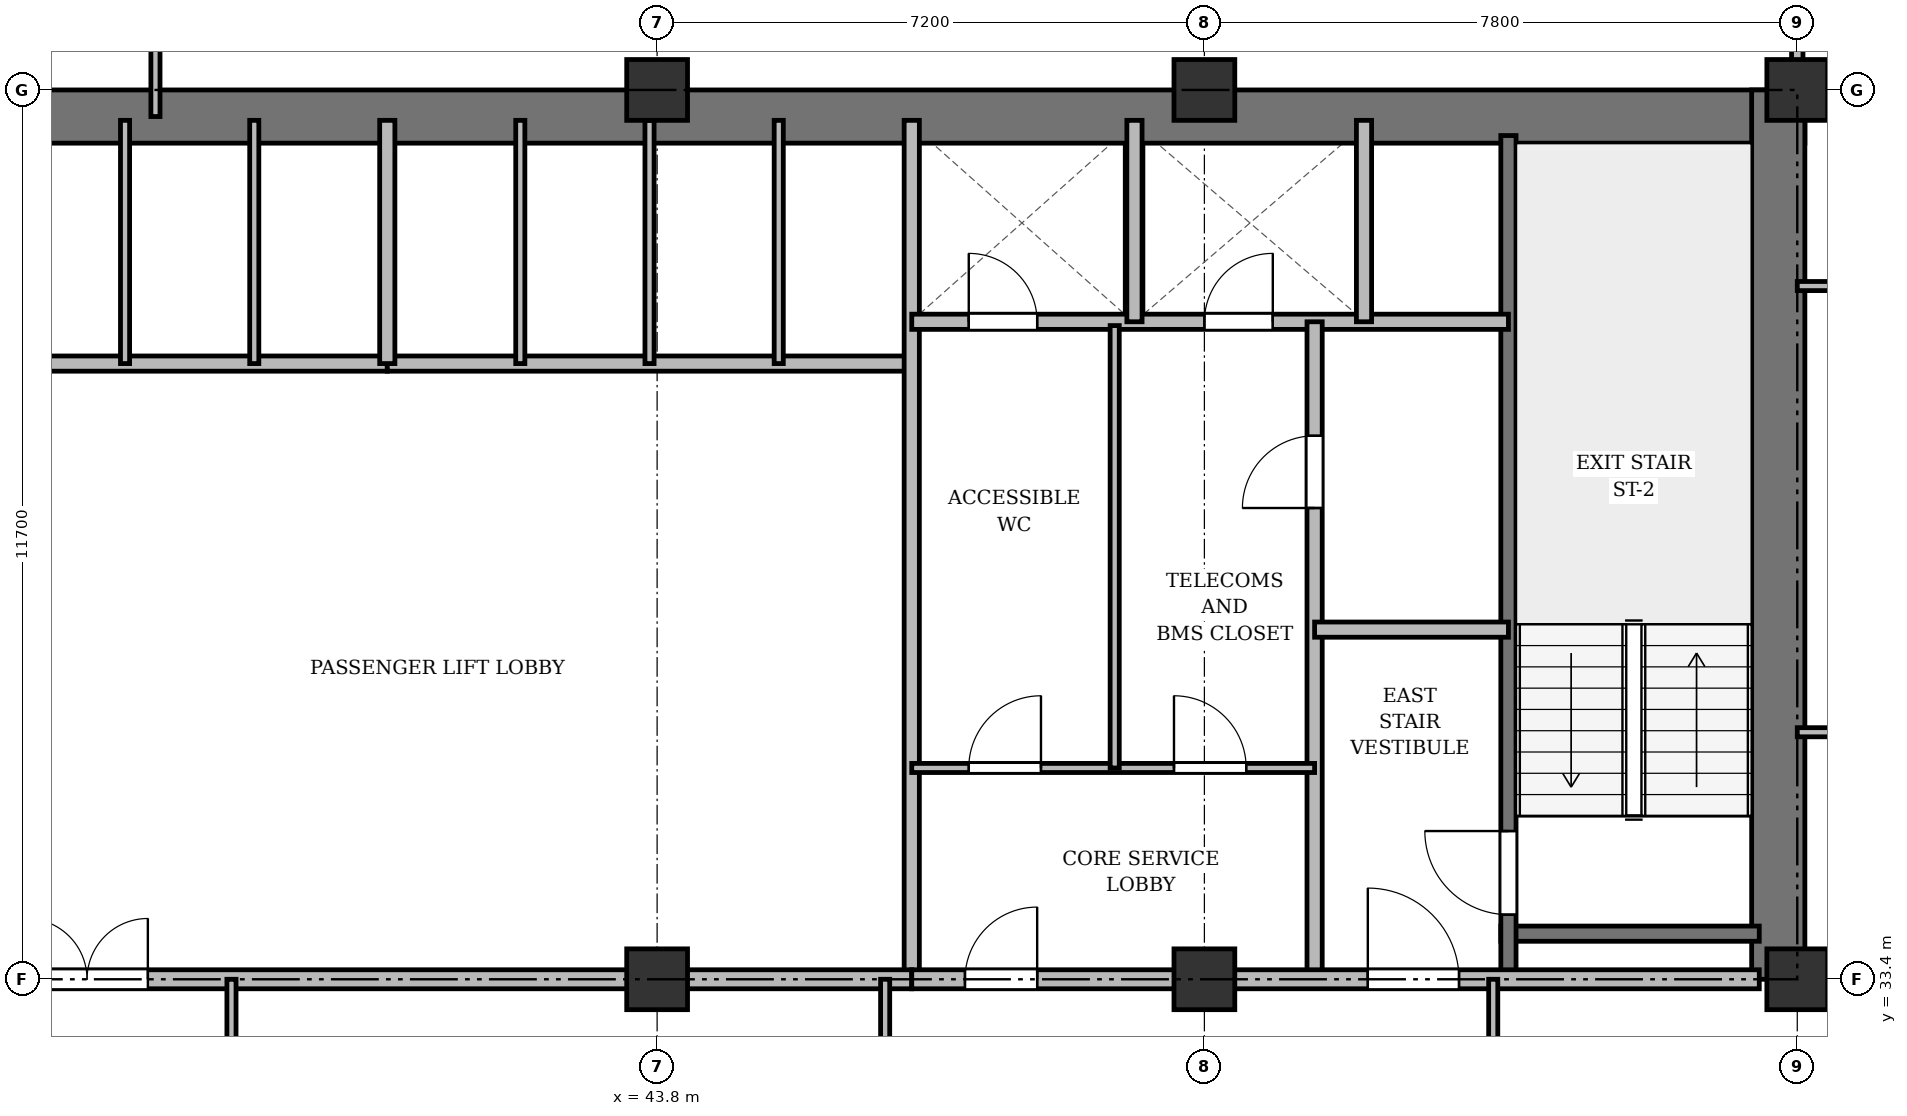
"""IFC4 building model, lengths in metres.
Left out: names, types, materials, properties, quantities, classifications, styles, units other than length and angle.
Written with IfcOpenShell. Run it as: python <this file> out.ifc"""

import sys

from ifc_helpers import new_model, si_unit, direction, frame, frame_2d, origin, origin_2d, place, context, subcontext, project, spatial, rectangle, extrude, source, transform, mapped, element, fill, save


model = new_model("IFC4")
c1 = context("Model", 3, precision=1e-05, world=origin(), true_north=direction((0.0, 1.0)))
c2 = subcontext(c1, "Body", "Model", "MODEL_VIEW")
j1 = project(units=[si_unit("LENGTHUNIT", "METRE"), si_unit("PLANEANGLEUNIT", "RADIAN")], contexts=[c1])
p1 = place(None, origin())
s1 = spatial("IfcSite", under=j1, at=p1, CompositionType="ELEMENT")
p2 = place(p1, origin())
s2 = spatial("IfcBuilding", under=s1, at=p2, CompositionType="ELEMENT")
p3 = place(p2, frame((0.0, 0.0, 85.3)))
s3 = spatial("IfcBuildingStorey", under=s2, at=p3, CompositionType="ELEMENT", Elevation=85.3)
m1 = source(origin(), c2, "Body", "SweptSolid", [
    extrude(rectangle(XDim=0.8, YDim=0.8, at=origin_2d()), origin(), (0.0, 0.0, 1.0), 3.6),
])
for number, where, z_axis, x_axis in (
    (1, (43.8, 33.4, 0.0), (0.0, 0.0, 1.0), (1.0, 0.0, 0.0)),
    (2, (43.8, 45.1, 0.0), (0.0, 0.0, 1.0), (1.0, 0.0, 0.0)),
    (3, (51.0, 33.4, 0.0), (0.0, 0.0, 1.0), (1.0, 0.0, 0.0)),
    (4, (51.0, 45.1, 0.0), (0.0, 0.0, 1.0), (1.0, 0.0, 0.0)),
    (5, (58.8, 33.4, 0.0), (0.0, 0.0, 1.0), (1.0, 0.0, 0.0)),
    (6, (58.8, 45.1, 0.0), (0.0, 0.0, 1.0), (1.0, 0.0, 0.0)),
):
    element("IfcColumn", number, at=place(p3, frame(where, z_axis=z_axis, x_axis=x_axis)), inside=s3, PredefinedType="COLUMN", context=c2, shape_type="MappedRepresentation", body=[
        mapped(m1, transform((0.0, 0.0, 0.0), x_axis=(1.0, 0.0, 0.0), y_axis=(0.0, 1.0, 0.0), z_axis=(0.0, 0.0, 1.0), scale=1.0)),
    ])
p4 = place(p3, frame((15.5, 44.75, 0.0), z_axis=(0.0, 0.0, 1.0), x_axis=(1.0, 0.0, 0.0)))
e7 = element("IfcWall", 7, at=p4, inside=s3, PredefinedType="SHEAR", context=c2, shape_type="SweptSolid", body=[
    extrude(rectangle(XDim=43.4, YDim=0.7, at=frame_2d((21.7, 0.0))), origin(), (0.0, 0.0, 1.0), 3.34),
])
p5 = place(p3, frame((58.55, 33.4, 0.0), z_axis=(0.0, 0.0, 1.0), x_axis=(0.0, 1.0, 0.0)))
e8 = element("IfcWall", 8, at=p5, inside=s3, PredefinedType="SHEAR", context=c2, shape_type="SweptSolid", body=[
    extrude(rectangle(XDim=11.7, YDim=0.7, at=frame_2d((5.85, 0.0))), origin(), (0.0, 0.0, 1.0), 3.34),
])
p6 = place(p3, frame((54.9, 34.0, 0.0), z_axis=(0.0, 0.0, 1.0), x_axis=(1.0, 0.0, 0.0)))
e9 = element("IfcWall", 9, at=p6, inside=s3, PredefinedType="SHEAR", context=c2, shape_type="SweptSolid", body=[
    extrude(rectangle(XDim=3.4, YDim=0.2, at=frame_2d((1.7, 0.0))), origin(), (0.0, 0.0, 1.0), 3.34),
])
p7 = place(p3, frame((55.0, 33.4, 0.0), z_axis=(0.0, 0.0, 1.0), x_axis=(0.0, 1.0, 0.0)))
e10 = element("IfcWall", 10, at=p7, inside=s3, PredefinedType="SHEAR", context=c2, shape_type="SweptSolid", body=[
    extrude(rectangle(XDim=11.1, YDim=0.2, at=frame_2d((5.55, 0.0))), origin(), (0.0, 0.0, 1.0), 3.34),
])
p8 = place(p7, frame((0.85, 0.0, 0.0)))
e11 = element("IfcOpeningElement", 11, at=p8, cuts=e10, PredefinedType="OPENING", context=c2, shape_type="SweptSolid", body=[
    extrude(rectangle(XDim=1.1, YDim=2.15, at=frame_2d((0.55, 1.075))), frame((0.0, 0.11, 0.0), z_axis=(0.0, -1.0, 0.0), x_axis=(1.0, 0.0, 0.0)), (0.0, 0.0, 1.0), 0.22),
])
p9 = place(p3, frame((33.35, 41.5, 0.0), z_axis=(0.0, 0.0, 1.0), x_axis=(1.0, 0.0, 0.0)))
e12 = element("IfcWall", 12, at=p9, inside=s3, PredefinedType="SOLIDWALL", context=c2, shape_type="SweptSolid", body=[
    extrude(rectangle(XDim=6.9, YDim=0.2, at=frame_2d((3.45, 0.0))), origin(), (0.0, 0.0, 1.0), 3.34),
])
for number, where, z_axis, x_axis in (
    (13, (36.8, 41.5, 0.0), (0.0, 0.0, 1.0), (0.0, 1.0, 0.0)),
    (14, (38.5, 41.5, 0.0), (0.0, 0.0, 1.0), (0.0, 1.0, 0.0)),
):
    element("IfcWall", number, at=place(p3, frame(where, z_axis=z_axis, x_axis=x_axis)), inside=s3, PredefinedType="PARTITIONING", context=c2, shape_type="SweptSolid", body=[
        extrude(rectangle(XDim=3.2, YDim=0.12, at=frame_2d((1.6, 0.0))), origin(), (0.0, 0.0, 1.0), 3.34),
    ])
p10 = place(p3, frame((40.25, 41.5, 0.0), z_axis=(0.0, 0.0, 1.0), x_axis=(1.0, 0.0, 0.0)))
e15 = element("IfcWall", 15, at=p10, inside=s3, PredefinedType="SOLIDWALL", context=c2, shape_type="SweptSolid", body=[
    extrude(rectangle(XDim=6.9, YDim=0.2, at=frame_2d((3.45, 0.0))), origin(), (0.0, 0.0, 1.0), 2.84),
])
p11 = place(p3, frame((40.25, 41.5, 0.0), z_axis=(0.0, 0.0, 1.0), x_axis=(0.0, 1.0, 0.0)))
e16 = element("IfcWall", 16, at=p11, inside=s3, PredefinedType="SOLIDWALL", context=c2, shape_type="SweptSolid", body=[
    extrude(rectangle(XDim=3.2, YDim=0.2, at=frame_2d((1.6, 0.0))), origin(), (0.0, 0.0, 1.0), 3.34),
])
p12 = place(p3, frame((42.0, 41.5, 0.0), z_axis=(0.0, 0.0, 1.0), x_axis=(0.0, 1.0, 0.0)))
e17 = element("IfcWall", 17, at=p12, inside=s3, PredefinedType="PARTITIONING", context=c2, shape_type="SweptSolid", body=[
    extrude(rectangle(XDim=3.2, YDim=0.12, at=frame_2d((1.6, 0.0))), origin(), (0.0, 0.0, 1.0), 3.34),
])
p13 = place(p3, frame((43.7, 41.5, 0.0), z_axis=(0.0, 0.0, 1.0), x_axis=(0.0, 1.0, 0.0)))
e18 = element("IfcWall", 18, at=p13, inside=s3, PredefinedType="PARTITIONING", context=c2, shape_type="SweptSolid", body=[
    extrude(rectangle(XDim=3.2, YDim=0.12, at=frame_2d((1.6, 0.0))), origin(), (0.0, 0.0, 1.0), 2.84),
])
p14 = place(p3, frame((45.4, 41.5, 0.0), z_axis=(0.0, 0.0, 1.0), x_axis=(0.0, 1.0, 0.0)))
e19 = element("IfcWall", 19, at=p14, inside=s3, PredefinedType="PARTITIONING", context=c2, shape_type="SweptSolid", body=[
    extrude(rectangle(XDim=3.2, YDim=0.12, at=frame_2d((1.6, 0.0))), origin(), (0.0, 0.0, 1.0), 3.34),
])
p15 = place(p3, frame((47.15, 33.4, 0.0), z_axis=(0.0, 0.0, 1.0), x_axis=(0.0, 1.0, 0.0)))
e20 = element("IfcWall", 20, at=p15, inside=s3, PredefinedType="SOLIDWALL", context=c2, shape_type="SweptSolid", body=[
    extrude(rectangle(XDim=11.3, YDim=0.2, at=frame_2d((5.65, 0.0))), origin(), (0.0, 0.0, 1.0), 2.752),
])
p16 = place(p3, frame((26.3, 33.4, 0.0), z_axis=(0.0, 0.0, 1.0), x_axis=(1.0, 0.0, 0.0)))
e21 = element("IfcWall", 21, at=p16, inside=s3, PredefinedType="PARTITIONING", context=c2, shape_type="SweptSolid", body=[
    extrude(rectangle(XDim=20.85, YDim=0.25, at=frame_2d((10.425, 0.0))), origin(), (0.0, 0.0, 1.0), 2.752),
])
p17 = place(p16, frame((9.2, 0.0, 0.0)))
e22 = element("IfcOpeningElement", 22, at=p17, cuts=e21, PredefinedType="OPENING", context=c2, shape_type="SweptSolid", body=[
    extrude(rectangle(XDim=1.6, YDim=2.2, at=frame_2d((0.8, 1.1))), frame((0.0, 0.135, 0.0), z_axis=(0.0, -1.0, 0.0), x_axis=(1.0, 0.0, 0.0)), (0.0, 0.0, 1.0), 0.27),
])
p18 = place(p3, frame((47.15, 42.05, 0.0), z_axis=(0.0, 0.0, 1.0), x_axis=(1.0, 0.0, 0.0)))
e23 = element("IfcWall", 23, at=p18, inside=s3, PredefinedType="SOLIDWALL", context=c2, shape_type="SweptSolid", body=[
    extrude(rectangle(XDim=7.85, YDim=0.2, at=frame_2d((3.925, 0.0))), origin(), (0.0, 0.0, 1.0), 2.84),
])
p19 = place(p18, frame((0.75, 0.0, 0.0)))
e24 = element("IfcOpeningElement", 24, at=p19, cuts=e23, PredefinedType="OPENING", context=c2, shape_type="SweptSolid", body=[
    extrude(rectangle(XDim=0.9, YDim=2.1, at=frame_2d((0.45, 1.05))), frame((0.0, 0.11, 0.0), z_axis=(0.0, -1.0, 0.0), x_axis=(1.0, 0.0, 0.0)), (0.0, 0.0, 1.0), 0.22),
])
p20 = place(p18, frame((3.85, 0.0, 0.0)))
e25 = element("IfcOpeningElement", 25, at=p20, cuts=e23, PredefinedType="OPENING", context=c2, shape_type="SweptSolid", body=[
    extrude(rectangle(XDim=0.9, YDim=2.1, at=frame_2d((0.45, 1.05))), frame((0.0, 0.11, 0.0), z_axis=(0.0, -1.0, 0.0), x_axis=(1.0, 0.0, 0.0)), (0.0, 0.0, 1.0), 0.22),
])
for number, where, z_axis, x_axis in (
    (26, (50.08, 42.05, 0.0), (0.0, 0.0, 1.0), (0.0, 1.0, 0.0)),
    (27, (53.1, 42.05, 0.0), (0.0, 0.0, 1.0), (0.0, 1.0, 0.0)),
):
    element("IfcWall", number, at=place(p3, frame(where, z_axis=z_axis, x_axis=x_axis)), inside=s3, PredefinedType="SOLIDWALL", context=c2, shape_type="SweptSolid", body=[
        extrude(rectangle(XDim=2.65, YDim=0.2, at=frame_2d((1.325, 0.0))), origin(), (0.0, 0.0, 1.0), 3.34),
    ])
p21 = place(p3, frame((52.45, 33.4, 0.0), z_axis=(0.0, 0.0, 1.0), x_axis=(0.0, 1.0, 0.0)))
e28 = element("IfcWall", 28, at=p21, inside=s3, PredefinedType="PARTITIONING", context=c2, shape_type="SweptSolid", body=[
    extrude(rectangle(XDim=8.65, YDim=0.2, at=frame_2d((4.325, 0.0))), origin(), (0.0, 0.0, 1.0), 2.752),
])
p22 = place(p21, frame((6.2, 0.0, 0.0)))
e29 = element("IfcOpeningElement", 29, at=p22, cuts=e28, PredefinedType="OPENING", context=c2, shape_type="SweptSolid", body=[
    extrude(rectangle(XDim=0.95, YDim=2.15, at=frame_2d((0.475, 1.075))), frame((0.0, 0.11, 0.0), z_axis=(0.0, -1.0, 0.0), x_axis=(1.0, 0.0, 0.0)), (0.0, 0.0, 1.0), 0.22),
])
p23 = place(p3, frame((52.45, 38.0, 0.0), z_axis=(0.0, 0.0, 1.0), x_axis=(1.0, 0.0, 0.0)))
e30 = element("IfcWall", 30, at=p23, inside=s3, PredefinedType="PARTITIONING", context=c2, shape_type="SweptSolid", body=[
    extrude(rectangle(XDim=2.55, YDim=0.2, at=frame_2d((1.275, 0.0))), origin(), (0.0, 0.0, 1.0), 3.34),
])
p24 = place(p3, frame((47.15, 36.18, 0.0), z_axis=(0.0, 0.0, 1.0), x_axis=(1.0, 0.0, 0.0)))
e31 = element("IfcWall", 31, at=p24, inside=s3, PredefinedType="PARTITIONING", context=c2, shape_type="SweptSolid", body=[
    extrude(rectangle(XDim=5.3, YDim=0.12, at=frame_2d((2.65, 0.0))), origin(), (0.0, 0.0, 1.0), 2.84),
])
p25 = place(p24, frame((0.75, 0.0, 0.0)))
e32 = element("IfcOpeningElement", 32, at=p25, cuts=e31, PredefinedType="OPENING", context=c2, shape_type="SweptSolid", body=[
    extrude(rectangle(XDim=0.95, YDim=2.15, at=frame_2d((0.475, 1.075))), frame((0.0, 0.07, 0.0), z_axis=(0.0, -1.0, 0.0), x_axis=(1.0, 0.0, 0.0)), (0.0, 0.0, 1.0), 0.14),
])
p26 = place(p24, frame((3.45, 0.0, 0.0)))
e33 = element("IfcOpeningElement", 33, at=p26, cuts=e31, PredefinedType="OPENING", context=c2, shape_type="SweptSolid", body=[
    extrude(rectangle(XDim=0.95, YDim=2.15, at=frame_2d((0.475, 1.075))), frame((0.0, 0.07, 0.0), z_axis=(0.0, -1.0, 0.0), x_axis=(1.0, 0.0, 0.0)), (0.0, 0.0, 1.0), 0.14),
])
p27 = place(p3, frame((49.82, 36.18, 0.0), z_axis=(0.0, 0.0, 1.0), x_axis=(0.0, 1.0, 0.0)))
e34 = element("IfcWall", 34, at=p27, inside=s3, PredefinedType="PARTITIONING", context=c2, shape_type="SweptSolid", body=[
    extrude(rectangle(XDim=5.82, YDim=0.12, at=frame_2d((2.91, 0.0))), origin(), (0.0, 0.0, 1.0), 3.34),
])
p28 = place(p3, frame((47.15, 33.4, 0.0), z_axis=(0.0, 0.0, 1.0), x_axis=(1.0, 0.0, 0.0)))
e35 = element("IfcWall", 35, at=p28, inside=s3, PredefinedType="PARTITIONING", context=c2, shape_type="SweptSolid", body=[
    extrude(rectangle(XDim=11.15, YDim=0.25, at=frame_2d((5.575, 0.0))), origin(), (0.0, 0.0, 1.0), 2.752),
])
p29 = place(p28, frame((0.7, 0.0, 0.0)))
e36 = element("IfcOpeningElement", 36, at=p29, cuts=e35, PredefinedType="OPENING", context=c2, shape_type="SweptSolid", body=[
    extrude(rectangle(XDim=0.95, YDim=2.15, at=frame_2d((0.475, 1.075))), frame((0.0, 0.135, 0.0), z_axis=(0.0, -1.0, 0.0), x_axis=(1.0, 0.0, 0.0)), (0.0, 0.0, 1.0), 0.27),
])
p30 = place(p28, frame((6.0, 0.0, 0.0)))
e37 = element("IfcOpeningElement", 37, at=p30, cuts=e35, PredefinedType="OPENING", context=c2, shape_type="SweptSolid", body=[
    extrude(rectangle(XDim=1.2, YDim=2.15, at=frame_2d((0.6, 1.075))), frame((0.0, 0.135, 0.0), z_axis=(0.0, -1.0, 0.0), x_axis=(1.0, 0.0, 0.0)), (0.0, 0.0, 1.0), 0.27),
])
for number, where, z_axis, x_axis in (
    (38, (38.2, 29.8, 0.0), (0.0, 0.0, 1.0), (0.0, 1.0, 0.0)),
    (39, (46.8, 29.8, 0.0), (0.0, 0.0, 1.0), (0.0, 1.0, 0.0)),
    (40, (54.8, 29.8, 0.0), (0.0, 0.0, 1.0), (0.0, 1.0, 0.0)),
):
    element("IfcWall", number, at=place(p3, frame(where, z_axis=z_axis, x_axis=x_axis)), inside=s3, PredefinedType="PARTITIONING", context=c2, shape_type="SweptSolid", body=[
        extrude(rectangle(XDim=3.6, YDim=0.12, at=frame_2d((1.8, 0.0))), origin(), (0.0, 0.0, 1.0), 2.752),
    ])
p31 = place(p3, frame((58.8, 36.65, 0.0), z_axis=(0.0, 0.0, 1.0), x_axis=(1.0, 0.0, 0.0)))
e41 = element("IfcWall", 41, at=p31, inside=s3, PredefinedType="PARTITIONING", context=c2, shape_type="SweptSolid", body=[
    extrude(rectangle(XDim=2.45, YDim=0.12, at=frame_2d((1.225, 0.0))), origin(), (0.0, 0.0, 1.0), 2.84),
])
p32 = place(p3, frame((58.8, 42.52, 0.0), z_axis=(0.0, 0.0, 1.0), x_axis=(1.0, 0.0, 0.0)))
e42 = element("IfcWall", 42, at=p32, inside=s3, PredefinedType="PARTITIONING", context=c2, shape_type="SweptSolid", body=[
    extrude(rectangle(XDim=5.425, YDim=0.12, at=frame_2d((2.712, 0.0))), origin(), (0.0, 0.0, 1.0), 2.84),
])
p33 = place(p32, frame((2.423, 0.0, 0.0)))
e43 = element("IfcOpeningElement", 43, at=p33, cuts=e42, PredefinedType="OPENING", context=c2, shape_type="SweptSolid", body=[
    extrude(rectangle(XDim=0.95, YDim=2.15, at=frame_2d((0.475, 1.075))), frame((0.0, 0.07, 0.0), z_axis=(0.0, -1.0, 0.0), x_axis=(1.0, 0.0, 0.0)), (0.0, 0.0, 1.0), 0.14),
])
p34 = place(p3, frame((58.8, 33.4, 0.0), z_axis=(0.0, 0.0, 1.0), x_axis=(1.0, 0.0, 0.0)))
e44 = element("IfcWall", 44, at=p34, inside=s3, PredefinedType="PARTITIONING", context=c2, shape_type="SweptSolid", body=[
    extrude(rectangle(XDim=10.85, YDim=0.15, at=frame_2d((5.425, 0.0))), origin(), (0.0, 0.0, 1.0), 2.752),
])
p35 = place(p34, frame((4.933, 0.0, 0.0)))
e45 = element("IfcOpeningElement", 45, at=p35, cuts=e44, PredefinedType="OPENING", context=c2, shape_type="SweptSolid", body=[
    extrude(rectangle(XDim=0.95, YDim=2.15, at=frame_2d((0.475, 1.075))), frame((0.0, 0.085, 0.0), z_axis=(0.0, -1.0, 0.0), x_axis=(1.0, 0.0, 0.0)), (0.0, 0.0, 1.0), 0.17),
])
p36 = place(p3, frame((37.2, 44.75, 0.0), z_axis=(0.0, 0.0, 1.0), x_axis=(0.0, 1.0, 0.0)))
e46 = element("IfcWall", 46, at=p36, inside=s3, PredefinedType="PARTITIONING", context=c2, shape_type="SweptSolid", body=[
    extrude(rectangle(XDim=3.61, YDim=0.12, at=frame_2d((1.805, 0.0))), origin(), (0.0, 0.0, 1.0), 2.752),
])
p37 = place(p36, frame((1.1, 0.0, 0.0)))
e47 = element("IfcOpeningElement", 47, at=p37, cuts=e46, PredefinedType="OPENING", context=c2, shape_type="SweptSolid", body=[
    extrude(rectangle(XDim=0.95, YDim=2.15, at=frame_2d((0.475, 1.075))), frame((0.0, 0.07, 0.0), z_axis=(0.0, -1.0, 0.0), x_axis=(1.0, 0.0, 0.0)), (0.0, 0.0, 1.0), 0.14),
])
p38 = place(p3, frame((58.8, 44.75, 0.0), z_axis=(0.0, 0.0, 1.0), x_axis=(0.0, 1.0, 0.0)))
e48 = element("IfcWall", 48, at=p38, inside=s3, PredefinedType="PARTITIONING", context=c2, shape_type="SweptSolid", body=[
    extrude(rectangle(XDim=3.61, YDim=0.15, at=frame_2d((1.805, 0.0))), origin(), (0.0, 0.0, 1.0), 2.84),
])
p39 = place(p38, frame((1.1, 0.0, 0.0)))
e49 = element("IfcOpeningElement", 49, at=p39, cuts=e48, PredefinedType="OPENING", context=c2, shape_type="SweptSolid", body=[
    extrude(rectangle(XDim=0.95, YDim=2.15, at=frame_2d((0.475, 1.075))), frame((0.0, 0.085, 0.0), z_axis=(0.0, -1.0, 0.0), x_axis=(1.0, 0.0, 0.0)), (0.0, 0.0, 1.0), 0.17),
])
m2 = source(origin(), c2, "Body", "SweptSolid", [
    extrude(rectangle(XDim=1.1, YDim=2.15, at=frame_2d((0.55, 1.075))), frame((0.0, 0.025, 0.0), z_axis=(0.0, -1.0, 0.0), x_axis=(1.0, 0.0, 0.0)), (0.0, 0.0, 1.0), 0.05),
])
p40 = place(p8, origin())
e50 = element("IfcDoor", 50, at=p40, inside=s3, OperationType="SINGLE_SWING_RIGHT", PredefinedType="DOOR", context=c2, shape_type="MappedRepresentation", body=[
    mapped(m2, transform((0.0, 0.0, 0.0), x_axis=(1.0, 0.0, 0.0), y_axis=(0.0, 1.0, 0.0), z_axis=(0.0, 0.0, 1.0), scale=1.0)),
])
fill(e11, e50)
m3 = source(origin(), c2, "Body", "SweptSolid", [
    extrude(rectangle(XDim=1.6, YDim=2.2, at=frame_2d((0.8, 1.1))), frame((0.0, 0.025, 0.0), z_axis=(0.0, -1.0, 0.0), x_axis=(1.0, 0.0, 0.0)), (0.0, 0.0, 1.0), 0.05),
])
p41 = place(p17, origin())
e51 = element("IfcDoor", 51, at=p41, inside=s3, OperationType="DOUBLE_DOOR_SINGLE_SWING", PredefinedType="DOOR", context=c2, shape_type="MappedRepresentation", body=[
    mapped(m3, transform((0.0, 0.0, 0.0), x_axis=(1.0, 0.0, 0.0), y_axis=(0.0, 1.0, 0.0), z_axis=(0.0, 0.0, 1.0), scale=1.0)),
])
fill(e22, e51)
m4 = source(origin(), c2, "Body", "SweptSolid", [
    extrude(rectangle(XDim=0.9, YDim=2.1, at=frame_2d((0.45, 1.05))), frame((0.0, 0.025, 0.0), z_axis=(0.0, -1.0, 0.0), x_axis=(1.0, 0.0, 0.0)), (0.0, 0.0, 1.0), 0.05),
])
p42 = place(p19, origin())
e52 = element("IfcDoor", 52, at=p42, inside=s3, OperationType="SINGLE_SWING_LEFT", PredefinedType="DOOR", context=c2, shape_type="MappedRepresentation", body=[
    mapped(m4, transform((0.0, 0.0, 0.0), x_axis=(1.0, 0.0, 0.0), y_axis=(0.0, 1.0, 0.0), z_axis=(0.0, 0.0, 1.0), scale=1.0)),
])
fill(e24, e52)
p43 = place(p20, origin())
e53 = element("IfcDoor", 53, at=p43, inside=s3, OperationType="SINGLE_SWING_RIGHT", PredefinedType="DOOR", context=c2, shape_type="MappedRepresentation", body=[
    mapped(m4, transform((0.0, 0.0, 0.0), x_axis=(1.0, 0.0, 0.0), y_axis=(0.0, 1.0, 0.0), z_axis=(0.0, 0.0, 1.0), scale=1.0)),
])
fill(e25, e53)
m5 = source(origin(), c2, "Body", "SweptSolid", [
    extrude(rectangle(XDim=0.95, YDim=2.15, at=frame_2d((0.475, 1.075))), frame((0.0, 0.025, 0.0), z_axis=(0.0, -1.0, 0.0), x_axis=(1.0, 0.0, 0.0)), (0.0, 0.0, 1.0), 0.05),
])
p44 = place(p22, origin())
e54 = element("IfcDoor", 54, at=p44, inside=s3, OperationType="SINGLE_SWING_LEFT", PredefinedType="DOOR", context=c2, shape_type="MappedRepresentation", body=[
    mapped(m5, transform((0.0, 0.0, 0.0), x_axis=(1.0, 0.0, 0.0), y_axis=(0.0, 1.0, 0.0), z_axis=(0.0, 0.0, 1.0), scale=1.0)),
])
fill(e29, e54)
p45 = place(p25, origin())
e55 = element("IfcDoor", 55, at=p45, inside=s3, OperationType="SINGLE_SWING_RIGHT", PredefinedType="DOOR", context=c2, shape_type="MappedRepresentation", body=[
    mapped(m5, transform((0.0, 0.0, 0.0), x_axis=(1.0, 0.0, 0.0), y_axis=(0.0, 1.0, 0.0), z_axis=(0.0, 0.0, 1.0), scale=1.0)),
])
fill(e32, e55)
p46 = place(p26, origin())
e56 = element("IfcDoor", 56, at=p46, inside=s3, OperationType="SINGLE_SWING_LEFT", PredefinedType="DOOR", context=c2, shape_type="MappedRepresentation", body=[
    mapped(m5, transform((0.0, 0.0, 0.0), x_axis=(1.0, 0.0, 0.0), y_axis=(0.0, 1.0, 0.0), z_axis=(0.0, 0.0, 1.0), scale=1.0)),
])
fill(e33, e56)
p47 = place(p29, origin())
e57 = element("IfcDoor", 57, at=p47, inside=s3, OperationType="SINGLE_SWING_RIGHT", PredefinedType="DOOR", context=c2, shape_type="MappedRepresentation", body=[
    mapped(m5, transform((0.0, 0.0, 0.0), x_axis=(1.0, 0.0, 0.0), y_axis=(0.0, 1.0, 0.0), z_axis=(0.0, 0.0, 1.0), scale=1.0)),
])
fill(e36, e57)
m6 = source(origin(), c2, "Body", "SweptSolid", [
    extrude(rectangle(XDim=1.2, YDim=2.15, at=frame_2d((0.6, 1.075))), frame((0.0, 0.025, 0.0), z_axis=(0.0, -1.0, 0.0), x_axis=(1.0, 0.0, 0.0)), (0.0, 0.0, 1.0), 0.05),
])
p48 = place(p30, origin())
e58 = element("IfcDoor", 58, at=p48, inside=s3, OperationType="SINGLE_SWING_LEFT", PredefinedType="DOOR", context=c2, shape_type="MappedRepresentation", body=[
    mapped(m6, transform((0.0, 0.0, 0.0), x_axis=(1.0, 0.0, 0.0), y_axis=(0.0, 1.0, 0.0), z_axis=(0.0, 0.0, 1.0), scale=1.0)),
])
fill(e37, e58)
save(model, sys.argv[1])
